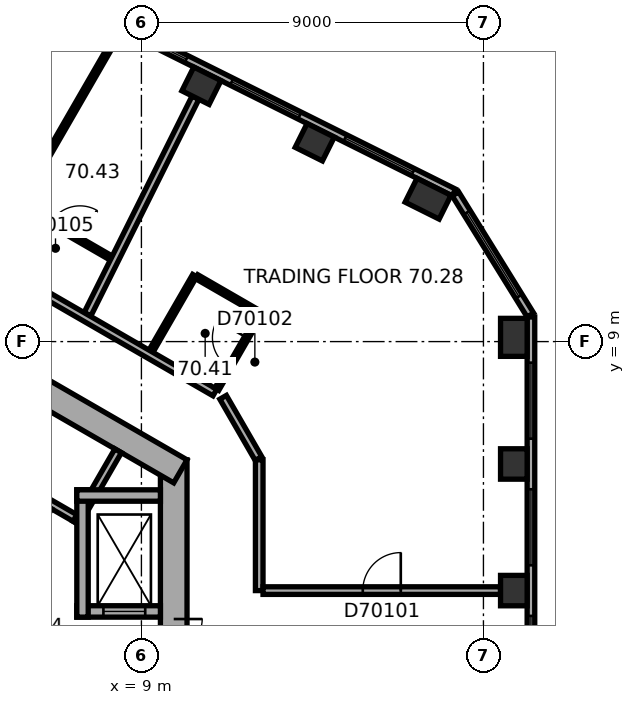
"""IFC4 building model, lengths in metres.
Left out: names, types, materials, properties, quantities, classifications, styles, units other than length and angle.
Written with IfcOpenShell. Run it as: python <this file> out.ifc"""

import sys

from ifc_helpers import new_model, si_unit, direction, frame, frame_2d, origin, origin_2d, place, context, subcontext, project, spatial, rectangle, extrude, element, fill, save


model = new_model("IFC4")
c1 = context("Model", 3, precision=1e-05, world=origin(), true_north=direction((0.0, 1.0)))
c2 = subcontext(c1, "Body", "Model", "MODEL_VIEW")
j1 = project(units=[si_unit("LENGTHUNIT", "METRE"), si_unit("PLANEANGLEUNIT", "RADIAN")], contexts=[c1])
p1 = place(None, origin())
s1 = spatial("IfcSite", under=j1, at=p1, CompositionType="ELEMENT")
p2 = place(p1, origin())
s2 = spatial("IfcBuilding", under=s1, at=p2, CompositionType="ELEMENT")
p3 = place(p2, frame((0.0, 0.0, 285.7)))
s3 = spatial("IfcBuildingStorey", under=s2, at=p3, CompositionType="ELEMENT", Elevation=285.7)
for number, where, z_axis, x_axis in (
    (1, (18.8, 2.448, 0.0), (0.0, 0.0, 1.0), (0.0, 1.0, 0.0)),
    (2, (18.8, 5.78, 0.0), (0.0, 0.0, 1.0), (0.0, 1.0, 0.0)),
):
    element("IfcColumn", number, at=place(p3, frame(where, z_axis=z_axis, x_axis=x_axis)), inside=s3, PredefinedType="COLUMN", context=c2, shape_type="SweptSolid", body=[
        extrude(rectangle(XDim=0.8, YDim=0.7, at=origin_2d()), origin(), (0.0, 0.0, 1.0), 3.7),
    ])
for number, where, z_axis, x_axis in (
    (3, (18.8, 9.112, 0.0), (0.0, 0.0, 1.0), (0.0, 1.0, 0.0)),
    (4, (16.543, 12.759, 0.0), (0.0, 0.0, 1.0), (-0.895, 0.446, 0.0)),
):
    element("IfcColumn", number, at=place(p3, frame(where, z_axis=z_axis, x_axis=x_axis)), inside=s3, PredefinedType="COLUMN", context=c2, shape_type="SweptSolid", body=[
        extrude(rectangle(XDim=1.0, YDim=0.7, at=origin_2d()), origin(), (0.0, 0.0, 1.0), 3.7),
    ])
for number, where, z_axis, x_axis in (
    (5, (13.561, 14.246, 0.0), (0.0, 0.0, 1.0), (-0.895, 0.446, 0.0)),
    (6, (10.58, 15.732, 0.0), (0.0, 0.0, 1.0), (-0.895, 0.446, 0.0)),
):
    element("IfcColumn", number, at=place(p3, frame(where, z_axis=z_axis, x_axis=x_axis)), inside=s3, PredefinedType="COLUMN", context=c2, shape_type="SweptSolid", body=[
        extrude(rectangle(XDim=0.8, YDim=0.7, at=origin_2d()), origin(), (0.0, 0.0, 1.0), 3.7),
    ])
p4 = place(p3, frame((9.85, -5.889, 0.0), z_axis=(0.0, 0.0, 1.0), x_axis=(0.0, 1.0, 0.0)))
e7 = element("IfcWall", 7, at=p4, inside=s3, PredefinedType="SHEAR", context=c2, shape_type="SweptSolid", body=[
    extrude(rectangle(XDim=11.778, YDim=0.7, at=frame_2d((5.889, 0.0))), origin(), (0.0, 0.0, 1.0), 3.7),
])
p5 = place(p4, frame((6.089, 0.0, 0.0)))
e8 = element("IfcOpeningElement", 8, at=p5, cuts=e7, PredefinedType="OPENING", context=c2, shape_type="SweptSolid", body=[
    extrude(rectangle(XDim=1.5, YDim=2.1, at=frame_2d((0.75, 1.05))), frame((0.0, 0.36, 0.0), z_axis=(0.0, -1.0, 0.0), x_axis=(1.0, 0.0, 0.0)), (0.0, 0.0, 1.0), 0.72),
])
p6 = place(p4, frame((2.939, 0.0, 0.0)))
e9 = element("IfcOpeningElement", 9, at=p6, cuts=e7, PredefinedType="OPENING", context=c2, shape_type="SweptSolid", body=[
    extrude(rectangle(XDim=0.9, YDim=2.1, at=frame_2d((0.45, 1.05))), frame((0.0, 0.36, 0.0), z_axis=(0.0, -1.0, 0.0), x_axis=(1.0, 0.0, 0.0)), (0.0, 0.0, 1.0), 0.72),
])
p7 = place(p3, frame((10.025, 5.586, 0.0), z_axis=(0.0, 0.0, 1.0), x_axis=(-0.866026453023, 0.499998182661, 0.0)))
e10 = element("IfcWall", 10, at=p7, inside=s3, PredefinedType="SHEAR", context=c2, shape_type="SweptSolid", body=[
    extrude(rectangle(XDim=11.778, YDim=0.7, at=frame_2d((5.889, 0.0))), origin(), (0.0, 0.0, 1.0), 3.7),
])
p8 = place(p7, frame((5.139, 0.0, 0.0)))
e11 = element("IfcOpeningElement", 11, at=p8, cuts=e10, PredefinedType="OPENING", context=c2, shape_type="SweptSolid", body=[
    extrude(rectangle(XDim=0.9, YDim=2.1, at=frame_2d((0.45, 1.05))), frame((0.0, 0.36, 0.0), z_axis=(0.0, -1.0, 0.0), x_axis=(1.0, 0.0, 0.0)), (0.0, 0.0, 1.0), 0.72),
])
p9 = place(p3, frame((19.25, -8.084, 0.0), z_axis=(0.0, 0.0, 1.0), x_axis=(0.0, 1.0, 0.0)))
e12 = element("IfcWall", 12, at=p9, inside=s3, PredefinedType="STANDARD", context=c2, shape_type="SweptSolid", body=[
    extrude(rectangle(XDim=17.731, YDim=0.2, at=frame_2d((8.866, 0.0))), origin(), (0.0, 0.0, 1.0), 3.7),
])
p10 = place(p9, frame((1.203, 0.0, 0.9)))
e13 = element("IfcOpeningElement", 13, at=p10, cuts=e12, PredefinedType="OPENING", context=c2, shape_type="SweptSolid", body=[
    extrude(rectangle(XDim=2.0, YDim=2.0, at=frame_2d((1.0, 1.0))), frame((0.0, 0.11, 0.0), z_axis=(0.0, -1.0, 0.0), x_axis=(1.0, 0.0, 0.0)), (0.0, 0.0, 1.0), 0.22),
])
p11 = place(p9, frame((4.535, 0.0, 0.9)))
e14 = element("IfcOpeningElement", 14, at=p11, cuts=e12, PredefinedType="OPENING", context=c2, shape_type="SweptSolid", body=[
    extrude(rectangle(XDim=2.0, YDim=2.0, at=frame_2d((1.0, 1.0))), frame((0.0, 0.11, 0.0), z_axis=(0.0, -1.0, 0.0), x_axis=(1.0, 0.0, 0.0)), (0.0, 0.0, 1.0), 0.22),
])
p12 = place(p9, frame((7.866, 0.0, 0.9)))
e15 = element("IfcOpeningElement", 15, at=p12, cuts=e12, PredefinedType="OPENING", context=c2, shape_type="SweptSolid", body=[
    extrude(rectangle(XDim=2.0, YDim=2.0, at=frame_2d((1.0, 1.0))), frame((0.0, 0.11, 0.0), z_axis=(0.0, -1.0, 0.0), x_axis=(1.0, 0.0, 0.0)), (0.0, 0.0, 1.0), 0.22),
])
p13 = place(p9, frame((11.198, 0.0, 0.9)))
e16 = element("IfcOpeningElement", 16, at=p13, cuts=e12, PredefinedType="OPENING", context=c2, shape_type="SweptSolid", body=[
    extrude(rectangle(XDim=2.0, YDim=2.0, at=frame_2d((1.0, 1.0))), frame((0.0, 0.11, 0.0), z_axis=(0.0, -1.0, 0.0), x_axis=(1.0, 0.0, 0.0)), (0.0, 0.0, 1.0), 0.22),
])
p14 = place(p9, frame((14.53, 0.0, 0.9)))
e17 = element("IfcOpeningElement", 17, at=p14, cuts=e12, PredefinedType="OPENING", context=c2, shape_type="SweptSolid", body=[
    extrude(rectangle(XDim=2.0, YDim=2.0, at=frame_2d((1.0, 1.0))), frame((0.0, 0.11, 0.0), z_axis=(0.0, -1.0, 0.0), x_axis=(1.0, 0.0, 0.0)), (0.0, 0.0, 1.0), 0.22),
])
p15 = place(p3, frame((19.235, 9.7, 0.0), z_axis=(0.0, 0.0, 1.0), x_axis=(-0.526233475464, 0.850340125656, 0.0)))
e18 = element("IfcWall", 18, at=p15, inside=s3, PredefinedType="STANDARD", context=c2, shape_type="SweptSolid", body=[
    extrude(rectangle(XDim=3.747, YDim=0.2, at=frame_2d((1.874, 0.0))), origin(), (0.0, 0.0, 1.0), 3.7),
])
p16 = place(p15, frame((0.573, 0.0, 0.9)))
e19 = element("IfcOpeningElement", 19, at=p16, cuts=e18, PredefinedType="OPENING", context=c2, shape_type="SweptSolid", body=[
    extrude(rectangle(XDim=2.6, YDim=2.0, at=frame_2d((1.3, 1.0))), frame((0.0, 0.11, 0.0), z_axis=(0.0, -1.0, 0.0), x_axis=(1.0, 0.0, 0.0)), (0.0, 0.0, 1.0), 0.22),
])
p17 = place(p3, frame((17.223, 12.923, 0.0), z_axis=(0.0, 0.0, 1.0), x_axis=(-0.894930561148, 0.44620543556, 0.0)))
e20 = element("IfcWall", 20, at=p17, inside=s3, PredefinedType="STANDARD", context=c2, shape_type="SweptSolid", body=[
    extrude(rectangle(XDim=17.731, YDim=0.2, at=frame_2d((8.866, 0.0))), origin(), (0.0, 0.0, 1.0), 3.7),
])
p18 = place(p17, frame((1.202, 0.0, 0.9)))
e21 = element("IfcOpeningElement", 21, at=p18, cuts=e20, PredefinedType="OPENING", context=c2, shape_type="SweptSolid", body=[
    extrude(rectangle(XDim=2.0, YDim=2.0, at=frame_2d((1.0, 1.0))), frame((0.0, 0.11, 0.0), z_axis=(0.0, -1.0, 0.0), x_axis=(1.0, 0.0, 0.0)), (0.0, 0.0, 1.0), 0.22),
])
p19 = place(p17, frame((4.533, 0.0, 0.9)))
e22 = element("IfcOpeningElement", 22, at=p19, cuts=e20, PredefinedType="OPENING", context=c2, shape_type="SweptSolid", body=[
    extrude(rectangle(XDim=2.0, YDim=2.0, at=frame_2d((1.0, 1.0))), frame((0.0, 0.11, 0.0), z_axis=(0.0, -1.0, 0.0), x_axis=(1.0, 0.0, 0.0)), (0.0, 0.0, 1.0), 0.22),
])
p20 = place(p17, frame((7.865, 0.0, 0.9)))
e23 = element("IfcOpeningElement", 23, at=p20, cuts=e20, PredefinedType="OPENING", context=c2, shape_type="SweptSolid", body=[
    extrude(rectangle(XDim=2.0, YDim=2.0, at=frame_2d((1.0, 1.0))), frame((0.0, 0.11, 0.0), z_axis=(0.0, -1.0, 0.0), x_axis=(1.0, 0.0, 0.0)), (0.0, 0.0, 1.0), 0.22),
])
p21 = place(p17, frame((11.197, 0.0, 0.9)))
e24 = element("IfcOpeningElement", 24, at=p21, cuts=e20, PredefinedType="OPENING", context=c2, shape_type="SweptSolid", body=[
    extrude(rectangle(XDim=2.0, YDim=2.0, at=frame_2d((1.0, 1.0))), frame((0.0, 0.11, 0.0), z_axis=(0.0, -1.0, 0.0), x_axis=(1.0, 0.0, 0.0)), (0.0, 0.0, 1.0), 0.22),
])
p22 = place(p17, frame((14.528, 0.0, 0.9)))
e25 = element("IfcOpeningElement", 25, at=p22, cuts=e20, PredefinedType="OPENING", context=c2, shape_type="SweptSolid", body=[
    extrude(rectangle(XDim=2.0, YDim=2.0, at=frame_2d((1.0, 1.0))), frame((0.0, 0.11, 0.0), z_axis=(0.0, -1.0, 0.0), x_axis=(1.0, 0.0, 0.0)), (0.0, 0.0, 1.0), 0.22),
])
p23 = place(p3, frame((7.424, 4.259, 0.0), z_axis=(0.0, 0.0, 1.0), x_axis=(-0.866026010844, 0.49999894854, 0.0)))
e26 = element("IfcWall", 26, at=p23, inside=s3, PredefinedType="PARTITIONING", context=c2, shape_type="SweptSolid", body=[
    extrude(rectangle(XDim=8.0, YDim=0.2, at=frame_2d((4.0, 0.0))), origin(), (0.0, 0.0, 1.0), 3.42),
])
p24 = place(p3, frame((7.287, 4.222, 0.0), z_axis=(0.0, 0.0, 1.0), x_axis=(0.499946605688, 0.86605622881, 0.0)))
e27 = element("IfcWall", 27, at=p24, inside=s3, PredefinedType="PARTITIONING", context=c2, shape_type="SweptSolid", body=[
    extrude(rectangle(XDim=2.2, YDim=0.2, at=frame_2d((1.1, 0.0))), origin(), (0.0, 0.0, 1.0), 3.42),
])
p25 = place(p3, frame((7.3, 1.9, 0.0), z_axis=(0.0, 0.0, 1.0), x_axis=(1.0, 0.0, 0.0)))
e28 = element("IfcWall", 28, at=p25, inside=s3, PredefinedType="SHEAR", context=c2, shape_type="SweptSolid", body=[
    extrude(rectangle(XDim=2.2, YDim=0.3, at=frame_2d((1.1, 0.0))), origin(), (0.0, 0.0, 1.0), 3.42),
])
p26 = place(p25, frame((0.7, 0.0, 0.0)))
e29 = element("IfcOpeningElement", 29, at=p26, cuts=e28, PredefinedType="OPENING", context=c2, shape_type="SweptSolid", body=[
    extrude(rectangle(XDim=1.1, YDim=2.1, at=frame_2d((0.55, 1.05))), frame((0.0, 0.16, 0.0), z_axis=(0.0, -1.0, 0.0), x_axis=(1.0, 0.0, 0.0)), (0.0, 0.0, 1.0), 0.32),
])
p27 = place(p3, frame((7.45, 1.75, 0.0), z_axis=(0.0, 0.0, 1.0), x_axis=(0.0, 1.0, 0.0)))
e30 = element("IfcWall", 30, at=p27, inside=s3, PredefinedType="SHEAR", context=c2, shape_type="SweptSolid", body=[
    extrude(rectangle(XDim=3.35, YDim=0.3, at=frame_2d((1.675, 0.0))), origin(), (0.0, 0.0, 1.0), 3.42),
])
p28 = place(p3, frame((7.3, 4.95, 0.0), z_axis=(0.0, 0.0, 1.0), x_axis=(1.0, 0.0, 0.0)))
e31 = element("IfcWall", 31, at=p28, inside=s3, PredefinedType="SHEAR", context=c2, shape_type="SweptSolid", body=[
    extrude(rectangle(XDim=2.2, YDim=0.3, at=frame_2d((1.1, 0.0))), origin(), (0.0, 0.0, 1.0), 3.42),
])
p29 = place(p3, frame((8.207, 11.197, 0.0), z_axis=(0.0, 0.0, 1.0), x_axis=(-0.866030514021, 0.499991148707, 0.0)))
e32 = element("IfcWall", 32, at=p29, inside=s3, PredefinedType="PARTITIONING", context=c2, shape_type="SweptSolid", body=[
    extrude(rectangle(XDim=6.476, YDim=0.12, at=frame_2d((3.238, 0.0))), origin(), (0.0, 0.0, 1.0), 3.42),
])
p30 = place(p29, frame((5.011, 0.0, 0.0)))
e33 = element("IfcOpeningElement", 33, at=p30, cuts=e32, PredefinedType="OPENING", context=c2, shape_type="SweptSolid", body=[
    extrude(rectangle(XDim=1.0, YDim=2.1, at=frame_2d((0.5, 1.05))), frame((0.0, 0.07, 0.0), z_axis=(0.0, -1.0, 0.0), x_axis=(1.0, 0.0, 0.0)), (0.0, 0.0, 1.0), 0.14),
])
p31 = place(p29, frame((0.95, 0.0, 0.0)))
e34 = element("IfcOpeningElement", 34, at=p31, cuts=e32, PredefinedType="OPENING", context=c2, shape_type="SweptSolid", body=[
    extrude(rectangle(XDim=0.9, YDim=2.1, at=frame_2d((0.45, 1.05))), frame((0.0, 0.07, 0.0), z_axis=(0.0, -1.0, 0.0), x_axis=(1.0, 0.0, 0.0)), (0.0, 0.0, 1.0), 0.14),
])
p32 = place(p29, frame((3.223, 0.0, 0.0)))
e35 = element("IfcOpeningElement", 35, at=p32, cuts=e32, PredefinedType="OPENING", context=c2, shape_type="SweptSolid", body=[
    extrude(rectangle(XDim=0.9, YDim=2.1, at=frame_2d((0.45, 1.05))), frame((0.0, 0.07, 0.0), z_axis=(0.0, -1.0, 0.0), x_axis=(1.0, 0.0, 0.0)), (0.0, 0.0, 1.0), 0.14),
])
p33 = place(p3, frame((8.435, 17.192, 0.0), z_axis=(0.0, 0.0, 1.0), x_axis=(-0.499982949935, -0.86603524742, 0.0)))
e36 = element("IfcWall", 36, at=p33, inside=s3, PredefinedType="PARTITIONING", context=c2, shape_type="SweptSolid", body=[
    extrude(rectangle(XDim=5.246, YDim=0.12, at=frame_2d((2.623, 0.0))), origin(), (0.0, 0.0, 1.0), 3.42),
])
p34 = place(p3, frame((9.251, 8.746, 0.0), z_axis=(0.0, 0.0, 1.0), x_axis=(0.499998129301, 0.86602648383, 0.0)))
e37 = element("IfcWall", 37, at=p34, inside=s3, PredefinedType="PARTITIONING", context=c2, shape_type="SweptSolid", body=[
    extrude(rectangle(XDim=2.3, YDim=0.12, at=frame_2d((1.15, 0.0))), origin(), (0.0, 0.0, 1.0), 3.42),
])
p35 = place(p3, frame((10.423, 15.419, 0.0), z_axis=(0.0, 0.0, 1.0), x_axis=(-0.446201045829, -0.89493274982, 0.0)))
e38 = element("IfcWall", 38, at=p35, inside=s3, PredefinedType="PARTITIONING", context=c2, shape_type="SweptSolid", body=[
    extrude(rectangle(XDim=6.367, YDim=0.2, at=frame_2d((3.184, 0.0))), origin(), (0.0, 0.0, 1.0), 2.87),
])
p36 = place(p3, frame((10.453, 10.708, 0.0), z_axis=(0.0, 0.0, 1.0), x_axis=(0.865988597889, -0.500063744262, 0.0)))
e39 = element("IfcWall", 39, at=p36, inside=s3, PredefinedType="PARTITIONING", context=c2, shape_type="SweptSolid", body=[
    extrude(rectangle(XDim=1.94, YDim=0.12, at=frame_2d((0.97, 0.0))), origin(), (0.0, 0.0, 1.0), 3.42),
])
p37 = place(p3, frame((10.934, 7.659, 0.0), z_axis=(0.0, 0.0, 1.0), x_axis=(-0.866030932647, 0.499990423607, 0.0)))
e40 = element("IfcWall", 40, at=p37, inside=s3, PredefinedType="PARTITIONING", context=c2, shape_type="SweptSolid", body=[
    extrude(rectangle(XDim=11.488, YDim=0.2, at=frame_2d((5.744, 0.0))), origin(), (0.0, 0.0, 1.0), 3.42),
])
p38 = place(p37, frame((6.764, 0.0, 0.0)))
e41 = element("IfcOpeningElement", 41, at=p38, cuts=e40, PredefinedType="OPENING", context=c2, shape_type="SweptSolid", body=[
    extrude(rectangle(XDim=1.0, YDim=2.1, at=frame_2d((0.5, 1.05))), frame((0.0, 0.11, 0.0), z_axis=(0.0, -1.0, 0.0), x_axis=(1.0, 0.0, 0.0)), (0.0, 0.0, 1.0), 0.22),
])
p39 = place(p3, frame((12.08, 5.924, 0.0), z_axis=(0.0, 0.0, 1.0), x_axis=(-0.500063286585, 0.865988862174, 0.0)))
e42 = element("IfcWall", 42, at=p39, inside=s3, PredefinedType="PARTITIONING", context=c2, shape_type="SweptSolid", body=[
    extrude(rectangle(XDim=1.86, YDim=0.2, at=frame_2d((0.93, 0.0))), origin(), (0.0, 0.0, 1.0), 3.42),
])
p40 = place(p3, frame((12.1, 2.448, 0.0), z_axis=(0.0, 0.0, 1.0), x_axis=(0.0, 1.0, 0.0)))
e43 = element("IfcWall", 43, at=p40, inside=s3, PredefinedType="PARTITIONING", context=c2, shape_type="SweptSolid", body=[
    extrude(rectangle(XDim=3.441, YDim=0.2, at=frame_2d((1.72, 0.0))), origin(), (0.0, 0.0, 1.0), 3.42),
])
p41 = place(p3, frame((12.104, 9.686, 0.0), z_axis=(0.0, 0.0, 1.0), x_axis=(-0.500077830873, -0.865980463445, 0.0)))
e44 = element("IfcWall", 44, at=p41, inside=s3, PredefinedType="PARTITIONING", context=c2, shape_type="SweptSolid", body=[
    extrude(rectangle(XDim=2.24, YDim=0.12, at=frame_2d((1.12, 0.0))), origin(), (0.0, 0.0, 1.0), 3.42),
])
p42 = place(p41, frame((0.67, 0.0, 0.0)))
e45 = element("IfcOpeningElement", 45, at=p42, cuts=e44, PredefinedType="OPENING", context=c2, shape_type="SweptSolid", body=[
    extrude(rectangle(XDim=0.9, YDim=2.1, at=frame_2d((0.45, 1.05))), frame((0.0, 0.07, 0.0), z_axis=(0.0, -1.0, 0.0), x_axis=(1.0, 0.0, 0.0)), (0.0, 0.0, 1.0), 0.14),
])
p43 = place(p3, frame((18.45, 2.448, 0.0), z_axis=(0.0, 0.0, 1.0), x_axis=(-1.0, 0.0, 0.0)))
e46 = element("IfcWall", 46, at=p43, inside=s3, PredefinedType="PARTITIONING", context=c2, shape_type="SweptSolid", body=[
    extrude(rectangle(XDim=6.25, YDim=0.2, at=frame_2d((3.125, 0.0))), origin(), (0.0, 0.0, 1.0), 3.42),
])
p44 = place(p43, frame((2.625, 0.0, 0.0)))
e47 = element("IfcOpeningElement", 47, at=p44, cuts=e46, PredefinedType="OPENING", context=c2, shape_type="SweptSolid", body=[
    extrude(rectangle(XDim=1.0, YDim=2.1, at=frame_2d((0.5, 1.05))), frame((0.0, 0.11, 0.0), z_axis=(0.0, -1.0, 0.0), x_axis=(1.0, 0.0, 0.0)), (0.0, 0.0, 1.0), 0.22),
])
p45 = place(p12, origin())
e48 = element("IfcWindow", 48, at=p45, inside=s3, PartitioningType="SINGLE_PANEL", PredefinedType="WINDOW", context=c2, shape_type="SweptSolid", body=[
    extrude(rectangle(XDim=2.0, YDim=2.0, at=frame_2d((1.0, 1.0))), frame((0.0, 0.03, 0.0), z_axis=(0.0, -1.0, 0.0), x_axis=(1.0, 0.0, 0.0)), (0.0, 0.0, 1.0), 0.06),
])
fill(e15, e48)
p46 = place(p13, origin())
e49 = element("IfcWindow", 49, at=p46, inside=s3, PartitioningType="SINGLE_PANEL", PredefinedType="WINDOW", context=c2, shape_type="SweptSolid", body=[
    extrude(rectangle(XDim=2.0, YDim=2.0, at=frame_2d((1.0, 1.0))), frame((0.0, 0.03, 0.0), z_axis=(0.0, -1.0, 0.0), x_axis=(1.0, 0.0, 0.0)), (0.0, 0.0, 1.0), 0.06),
])
fill(e16, e49)
p47 = place(p14, origin())
e50 = element("IfcWindow", 50, at=p47, inside=s3, PartitioningType="SINGLE_PANEL", PredefinedType="WINDOW", context=c2, shape_type="SweptSolid", body=[
    extrude(rectangle(XDim=2.0, YDim=2.0, at=frame_2d((1.0, 1.0))), frame((0.0, 0.03, 0.0), z_axis=(0.0, -1.0, 0.0), x_axis=(1.0, 0.0, 0.0)), (0.0, 0.0, 1.0), 0.06),
])
fill(e17, e50)
p48 = place(p16, origin())
e51 = element("IfcWindow", 51, at=p48, inside=s3, PartitioningType="SINGLE_PANEL", PredefinedType="WINDOW", context=c2, shape_type="SweptSolid", body=[
    extrude(rectangle(XDim=2.6, YDim=2.0, at=frame_2d((1.3, 1.0))), frame((0.0, 0.03, 0.0), z_axis=(0.0, -1.0, 0.0), x_axis=(1.0, 0.0, 0.0)), (0.0, 0.0, 1.0), 0.06),
])
fill(e19, e51)
p49 = place(p18, origin())
e52 = element("IfcWindow", 52, at=p49, inside=s3, PartitioningType="SINGLE_PANEL", PredefinedType="WINDOW", context=c2, shape_type="SweptSolid", body=[
    extrude(rectangle(XDim=2.0, YDim=2.0, at=frame_2d((1.0, 1.0))), frame((0.0, 0.03, 0.0), z_axis=(0.0, -1.0, 0.0), x_axis=(1.0, 0.0, 0.0)), (0.0, 0.0, 1.0), 0.06),
])
fill(e21, e52)
p50 = place(p19, origin())
e53 = element("IfcWindow", 53, at=p50, inside=s3, PartitioningType="SINGLE_PANEL", PredefinedType="WINDOW", context=c2, shape_type="SweptSolid", body=[
    extrude(rectangle(XDim=2.0, YDim=2.0, at=frame_2d((1.0, 1.0))), frame((0.0, 0.03, 0.0), z_axis=(0.0, -1.0, 0.0), x_axis=(1.0, 0.0, 0.0)), (0.0, 0.0, 1.0), 0.06),
])
fill(e22, e53)
p51 = place(p20, origin())
e54 = element("IfcWindow", 54, at=p51, inside=s3, PartitioningType="SINGLE_PANEL", PredefinedType="WINDOW", context=c2, shape_type="SweptSolid", body=[
    extrude(rectangle(XDim=2.0, YDim=2.0, at=frame_2d((1.0, 1.0))), frame((0.0, 0.03, 0.0), z_axis=(0.0, -1.0, 0.0), x_axis=(1.0, 0.0, 0.0)), (0.0, 0.0, 1.0), 0.06),
])
fill(e23, e54)
p52 = place(p5, origin())
e55 = element("IfcDoor", 55, at=p52, inside=s3, OperationType="DOUBLE_DOOR_SINGLE_SWING", PredefinedType="DOOR", context=c2, shape_type="SweptSolid", body=[
    extrude(rectangle(XDim=1.5, YDim=2.1, at=frame_2d((0.75, 1.05))), frame((0.0, 0.025, 0.0), z_axis=(0.0, -1.0, 0.0), x_axis=(1.0, 0.0, 0.0)), (0.0, 0.0, 1.0), 0.05),
])
fill(e8, e55)
p53 = place(p26, origin())
e56 = element("IfcDoor", 56, at=p53, inside=s3, OperationType="DOUBLE_DOOR_SLIDING", PredefinedType="DOOR", context=c2, shape_type="SweptSolid", body=[
    extrude(rectangle(XDim=1.1, YDim=2.1, at=frame_2d((0.55, 1.05))), frame((0.0, 0.025, 0.0), z_axis=(0.0, -1.0, 0.0), x_axis=(1.0, 0.0, 0.0)), (0.0, 0.0, 1.0), 0.05),
])
fill(e29, e56)
p54 = place(p44, origin())
e57 = element("IfcDoor", 57, at=p54, inside=s3, OperationType="SINGLE_SWING_LEFT", PredefinedType="DOOR", context=c2, shape_type="SweptSolid", body=[
    extrude(rectangle(XDim=1.0, YDim=2.1, at=frame_2d((0.5, 1.05))), frame((0.0, 0.025, 0.0), z_axis=(0.0, -1.0, 0.0), x_axis=(1.0, 0.0, 0.0)), (0.0, 0.0, 1.0), 0.05),
])
fill(e47, e57)
p55 = place(p42, origin())
e58 = element("IfcDoor", 58, at=p55, inside=s3, OperationType="SINGLE_SWING_LEFT", PredefinedType="DOOR", context=c2, shape_type="SweptSolid", body=[
    extrude(rectangle(XDim=0.9, YDim=2.1, at=frame_2d((0.45, 1.05))), frame((0.0, 0.025, 0.0), z_axis=(0.0, -1.0, 0.0), x_axis=(1.0, 0.0, 0.0)), (0.0, 0.0, 1.0), 0.05),
])
fill(e45, e58)
p56 = place(p31, origin())
e59 = element("IfcDoor", 59, at=p56, inside=s3, OperationType="SINGLE_SWING_LEFT", PredefinedType="DOOR", context=c2, shape_type="SweptSolid", body=[
    extrude(rectangle(XDim=0.9, YDim=2.1, at=frame_2d((0.45, 1.05))), frame((0.0, 0.025, 0.0), z_axis=(0.0, -1.0, 0.0), x_axis=(1.0, 0.0, 0.0)), (0.0, 0.0, 1.0), 0.05),
])
fill(e34, e59)
save(model, sys.argv[1])
